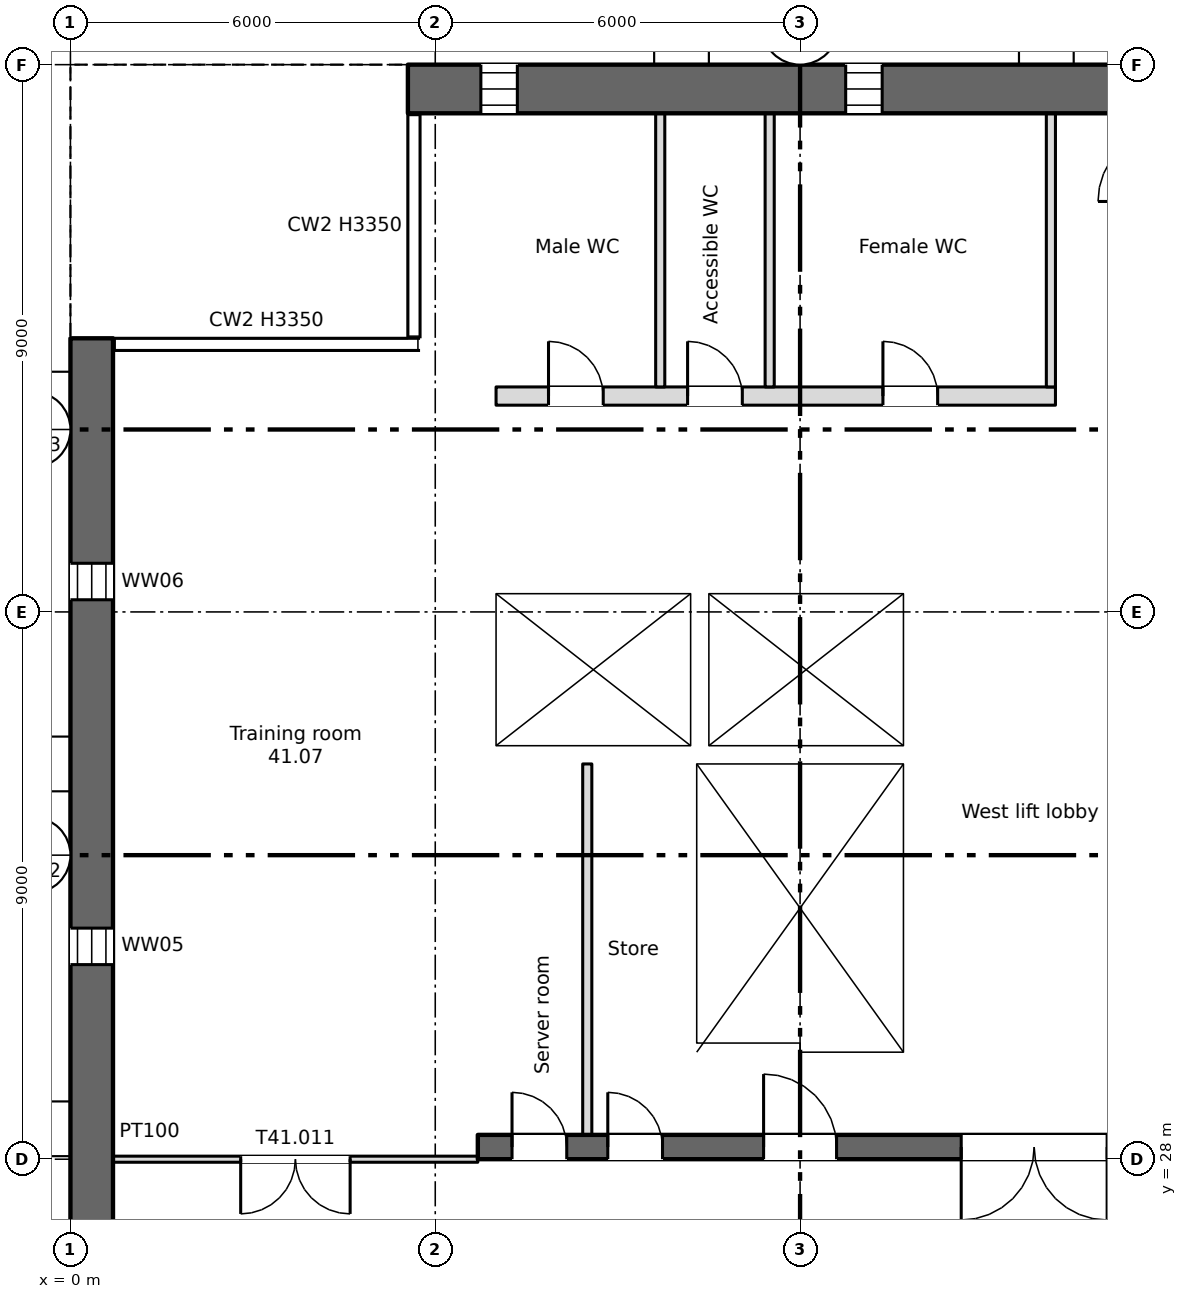
"""IFC4 building model, lengths in metres.
Left out: names, types, materials, properties, quantities, classifications, styles, units other than length and angle.
Written with IfcOpenShell. Run it as: python <this file> out.ifc"""

import sys

from ifc_helpers import new_model, si_unit, direction, frame, frame_2d, origin, place, context, subcontext, project, spatial, rectangle, extrude, element, fill, save


model = new_model("IFC4")
c1 = context("Model", 3, precision=1e-05, world=origin(), true_north=direction((0.0, 1.0)))
c2 = subcontext(c1, "Body", "Model", "MODEL_VIEW")
j1 = project(units=[si_unit("LENGTHUNIT", "METRE"), si_unit("PLANEANGLEUNIT", "RADIAN")], contexts=[c1])
p1 = place(None, origin())
s1 = spatial("IfcSite", under=j1, at=p1, CompositionType="ELEMENT")
p2 = place(p1, origin())
s2 = spatial("IfcBuilding", under=s1, at=p2, CompositionType="ELEMENT")
p3 = place(p2, frame((0.0, 0.0, 95.0)))
s3 = spatial("IfcBuildingStorey", under=s2, at=p3, CompositionType="ELEMENT", Elevation=95.0)
p4 = place(p3, frame((0.35, 6.0, 0.0), z_axis=(0.0, 0.0, 1.0), x_axis=(0.0, 1.0, 0.0)))
e1 = element("IfcWall", 1, at=p4, inside=s3, PredefinedType="SHEAR", context=c2, shape_type="SweptSolid", body=[
    extrude(rectangle(XDim=35.5, YDim=0.7, at=frame_2d((17.75, 0.0))), origin(), (0.0, 0.0, 1.0), 3.35),
])
p5 = place(p4, frame((1.2, 0.0, 0.6)))
e2 = element("IfcOpeningElement", 2, at=p5, cuts=e1, PredefinedType="OPENING", context=c2, shape_type="SweptSolid", body=[
    extrude(rectangle(XDim=0.6, YDim=2.4, at=frame_2d((0.3, 1.2))), frame((0.0, 0.36, 0.0), z_axis=(0.0, -1.0, 0.0), x_axis=(1.0, 0.0, 0.0)), (0.0, 0.0, 1.0), 0.72),
])
p6 = place(p4, frame((7.2, 0.0, 0.6)))
e3 = element("IfcOpeningElement", 3, at=p6, cuts=e1, PredefinedType="OPENING", context=c2, shape_type="SweptSolid", body=[
    extrude(rectangle(XDim=0.6, YDim=2.4, at=frame_2d((0.3, 1.2))), frame((0.0, 0.36, 0.0), z_axis=(0.0, -1.0, 0.0), x_axis=(1.0, 0.0, 0.0)), (0.0, 0.0, 1.0), 0.72),
])
p7 = place(p4, frame((13.2, 0.0, 0.6)))
e4 = element("IfcOpeningElement", 4, at=p7, cuts=e1, PredefinedType="OPENING", context=c2, shape_type="SweptSolid", body=[
    extrude(rectangle(XDim=0.6, YDim=2.4, at=frame_2d((0.3, 1.2))), frame((0.0, 0.36, 0.0), z_axis=(0.0, -1.0, 0.0), x_axis=(1.0, 0.0, 0.0)), (0.0, 0.0, 1.0), 0.72),
])
p8 = place(p4, frame((19.2, 0.0, 0.6)))
e5 = element("IfcOpeningElement", 5, at=p8, cuts=e1, PredefinedType="OPENING", context=c2, shape_type="SweptSolid", body=[
    extrude(rectangle(XDim=0.6, YDim=2.4, at=frame_2d((0.3, 1.2))), frame((0.0, 0.36, 0.0), z_axis=(0.0, -1.0, 0.0), x_axis=(1.0, 0.0, 0.0)), (0.0, 0.0, 1.0), 0.72),
])
p9 = place(p4, frame((25.2, 0.0, 0.6)))
e6 = element("IfcOpeningElement", 6, at=p9, cuts=e1, PredefinedType="OPENING", context=c2, shape_type="SweptSolid", body=[
    extrude(rectangle(XDim=0.6, YDim=2.4, at=frame_2d((0.3, 1.2))), frame((0.0, 0.36, 0.0), z_axis=(0.0, -1.0, 0.0), x_axis=(1.0, 0.0, 0.0)), (0.0, 0.0, 1.0), 0.72),
])
p10 = place(p4, frame((31.2, 0.0, 0.6)))
e7 = element("IfcOpeningElement", 7, at=p10, cuts=e1, PredefinedType="OPENING", context=c2, shape_type="SweptSolid", body=[
    extrude(rectangle(XDim=0.6, YDim=2.4, at=frame_2d((0.3, 1.2))), frame((0.0, 0.36, 0.0), z_axis=(0.0, -1.0, 0.0), x_axis=(1.0, 0.0, 0.0)), (0.0, 0.0, 1.0), 0.72),
])
p11 = place(p3, frame((5.55, 45.6, 0.0), z_axis=(0.0, 0.0, 1.0), x_axis=(1.0, 0.0, 0.0)))
e8 = element("IfcWall", 8, at=p11, inside=s3, PredefinedType="SHEAR", context=c2, shape_type="SweptSolid", body=[
    extrude(rectangle(XDim=60.9, YDim=0.8, at=frame_2d((30.45, 0.0))), origin(), (0.0, 0.0, 1.0), 3.35),
])
p12 = place(p11, frame((1.2, 0.0, 0.6)))
e9 = element("IfcOpeningElement", 9, at=p12, cuts=e8, PredefinedType="OPENING", context=c2, shape_type="SweptSolid", body=[
    extrude(rectangle(XDim=0.6, YDim=2.4, at=frame_2d((0.3, 1.2))), frame((0.0, 0.41, 0.0), z_axis=(0.0, -1.0, 0.0), x_axis=(1.0, 0.0, 0.0)), (0.0, 0.0, 1.0), 0.82),
])
p13 = place(p11, frame((7.2, 0.0, 0.6)))
e10 = element("IfcOpeningElement", 10, at=p13, cuts=e8, PredefinedType="OPENING", context=c2, shape_type="SweptSolid", body=[
    extrude(rectangle(XDim=0.6, YDim=2.4, at=frame_2d((0.3, 1.2))), frame((0.0, 0.41, 0.0), z_axis=(0.0, -1.0, 0.0), x_axis=(1.0, 0.0, 0.0)), (0.0, 0.0, 1.0), 0.82),
])
p14 = place(p11, frame((55.2, 0.0, 0.6)))
e11 = element("IfcOpeningElement", 11, at=p14, cuts=e8, PredefinedType="OPENING", context=c2, shape_type="SweptSolid", body=[
    extrude(rectangle(XDim=0.6, YDim=2.4, at=frame_2d((0.3, 1.2))), frame((0.0, 0.41, 0.0), z_axis=(0.0, -1.0, 0.0), x_axis=(1.0, 0.0, 0.0)), (0.0, 0.0, 1.0), 0.82),
])
p15 = place(p3, frame((6.7, 28.2, 0.0), z_axis=(0.0, 0.0, 1.0), x_axis=(1.0, 0.0, 0.0)))
e12 = element("IfcWall", 12, at=p15, inside=s3, PredefinedType="SHEAR", context=c2, shape_type="SweptSolid", body=[
    extrude(rectangle(XDim=57.8, YDim=0.4, at=frame_2d((28.9, 0.0))), origin(), (0.0, 0.0, 1.0), 3.35),
])
p16 = place(p15, frame((12.812, 0.0, 0.0)))
e13 = element("IfcOpeningElement", 13, at=p16, cuts=e12, PredefinedType="OPENING", context=c2, shape_type="SweptSolid", body=[
    extrude(rectangle(XDim=0.9, YDim=2.1, at=frame_2d((0.45, 1.05))), frame((0.0, 0.21, 0.0), z_axis=(0.0, -1.0, 0.0), x_axis=(1.0, 0.0, 0.0)), (0.0, 0.0, 1.0), 0.42),
])
p17 = place(p15, frame((15.387, 0.0, 0.0)))
e14 = element("IfcOpeningElement", 14, at=p17, cuts=e12, PredefinedType="OPENING", context=c2, shape_type="SweptSolid", body=[
    extrude(rectangle(XDim=0.9, YDim=2.1, at=frame_2d((0.45, 1.05))), frame((0.0, 0.21, 0.0), z_axis=(0.0, -1.0, 0.0), x_axis=(1.0, 0.0, 0.0)), (0.0, 0.0, 1.0), 0.42),
])
p18 = place(p15, frame((48.312, 0.0, 0.0)))
e15 = element("IfcOpeningElement", 15, at=p18, cuts=e12, PredefinedType="OPENING", context=c2, shape_type="SweptSolid", body=[
    extrude(rectangle(XDim=0.9, YDim=2.1, at=frame_2d((0.45, 1.05))), frame((0.0, 0.21, 0.0), z_axis=(0.0, -1.0, 0.0), x_axis=(1.0, 0.0, 0.0)), (0.0, 0.0, 1.0), 0.42),
])
p19 = place(p15, frame((50.887, 0.0, 0.0)))
e16 = element("IfcOpeningElement", 16, at=p19, cuts=e12, PredefinedType="OPENING", context=c2, shape_type="SweptSolid", body=[
    extrude(rectangle(XDim=0.9, YDim=2.1, at=frame_2d((0.45, 1.05))), frame((0.0, 0.21, 0.0), z_axis=(0.0, -1.0, 0.0), x_axis=(1.0, 0.0, 0.0)), (0.0, 0.0, 1.0), 0.42),
])
p20 = place(p15, frame((0.562, 0.0, 0.0)))
e17 = element("IfcOpeningElement", 17, at=p20, cuts=e12, PredefinedType="OPENING", context=c2, shape_type="SweptSolid", body=[
    extrude(rectangle(XDim=0.9, YDim=2.1, at=frame_2d((0.45, 1.05))), frame((0.0, 0.21, 0.0), z_axis=(0.0, -1.0, 0.0), x_axis=(1.0, 0.0, 0.0)), (0.0, 0.0, 1.0), 0.42),
])
p21 = place(p15, frame((2.137, 0.0, 0.0)))
e18 = element("IfcOpeningElement", 18, at=p21, cuts=e12, PredefinedType="OPENING", context=c2, shape_type="SweptSolid", body=[
    extrude(rectangle(XDim=0.9, YDim=2.1, at=frame_2d((0.45, 1.05))), frame((0.0, 0.21, 0.0), z_axis=(0.0, -1.0, 0.0), x_axis=(1.0, 0.0, 0.0)), (0.0, 0.0, 1.0), 0.42),
])
p22 = place(p15, frame((4.7, 0.0, 0.0)))
e19 = element("IfcOpeningElement", 19, at=p22, cuts=e12, PredefinedType="OPENING", context=c2, shape_type="SweptSolid", body=[
    extrude(rectangle(XDim=1.2, YDim=2.1, at=frame_2d((0.6, 1.05))), frame((0.0, 0.21, 0.0), z_axis=(0.0, -1.0, 0.0), x_axis=(1.0, 0.0, 0.0)), (0.0, 0.0, 1.0), 0.42),
])
p23 = place(p15, frame((31.7, 0.0, 0.0)))
e20 = element("IfcOpeningElement", 20, at=p23, cuts=e12, PredefinedType="OPENING", context=c2, shape_type="SweptSolid", body=[
    extrude(rectangle(XDim=1.2, YDim=2.1, at=frame_2d((0.6, 1.05))), frame((0.0, 0.21, 0.0), z_axis=(0.0, -1.0, 0.0), x_axis=(1.0, 0.0, 0.0)), (0.0, 0.0, 1.0), 0.42),
])
p24 = place(p15, frame((55.2, 0.0, 0.0)))
e21 = element("IfcOpeningElement", 21, at=p24, cuts=e12, PredefinedType="OPENING", context=c2, shape_type="SweptSolid", body=[
    extrude(rectangle(XDim=1.2, YDim=2.1, at=frame_2d((0.6, 1.05))), frame((0.0, 0.21, 0.0), z_axis=(0.0, -1.0, 0.0), x_axis=(1.0, 0.0, 0.0)), (0.0, 0.0, 1.0), 0.42),
])
p25 = place(p15, frame((21.7, 0.0, 0.0)))
e22 = element("IfcOpeningElement", 22, at=p25, cuts=e12, PredefinedType="OPENING", context=c2, shape_type="SweptSolid", body=[
    extrude(rectangle(XDim=1.2, YDim=2.1, at=frame_2d((0.6, 1.05))), frame((0.0, 0.21, 0.0), z_axis=(0.0, -1.0, 0.0), x_axis=(1.0, 0.0, 0.0)), (0.0, 0.0, 1.0), 0.42),
])
p26 = place(p15, frame((41.7, 0.0, 0.0)))
e23 = element("IfcOpeningElement", 23, at=p26, cuts=e12, PredefinedType="OPENING", context=c2, shape_type="SweptSolid", body=[
    extrude(rectangle(XDim=1.2, YDim=2.1, at=frame_2d((0.6, 1.05))), frame((0.0, 0.21, 0.0), z_axis=(0.0, -1.0, 0.0), x_axis=(1.0, 0.0, 0.0)), (0.0, 0.0, 1.0), 0.42),
])
p27 = place(p15, frame((24.85, 0.0, 0.0)))
e24 = element("IfcOpeningElement", 24, at=p27, cuts=e12, PredefinedType="OPENING", context=c2, shape_type="SweptSolid", body=[
    extrude(rectangle(XDim=2.4, YDim=2.1, at=frame_2d((1.2, 1.05))), frame((0.0, 0.21, 0.0), z_axis=(0.0, -1.0, 0.0), x_axis=(1.0, 0.0, 0.0)), (0.0, 0.0, 1.0), 0.42),
])
p28 = place(p15, frame((37.35, 0.0, 0.0)))
e25 = element("IfcOpeningElement", 25, at=p28, cuts=e12, PredefinedType="OPENING", context=c2, shape_type="SweptSolid", body=[
    extrude(rectangle(XDim=2.4, YDim=2.1, at=frame_2d((1.2, 1.05))), frame((0.0, 0.21, 0.0), z_axis=(0.0, -1.0, 0.0), x_axis=(1.0, 0.0, 0.0)), (0.0, 0.0, 1.0), 0.42),
])
p29 = place(p15, frame((7.95, 0.0, 0.0)))
e26 = element("IfcOpeningElement", 26, at=p29, cuts=e12, PredefinedType="OPENING", context=c2, shape_type="SweptSolid", body=[
    extrude(rectangle(XDim=2.4, YDim=2.1, at=frame_2d((1.2, 1.05))), frame((0.0, 0.21, 0.0), z_axis=(0.0, -1.0, 0.0), x_axis=(1.0, 0.0, 0.0)), (0.0, 0.0, 1.0), 0.42),
])
p30 = place(p15, frame((28.85, 0.0, 0.0)))
e27 = element("IfcOpeningElement", 27, at=p30, cuts=e12, PredefinedType="OPENING", context=c2, shape_type="SweptSolid", body=[
    extrude(rectangle(XDim=0.9, YDim=2.1, at=frame_2d((0.45, 1.05))), frame((0.0, 0.21, 0.0), z_axis=(0.0, -1.0, 0.0), x_axis=(1.0, 0.0, 0.0)), (0.0, 0.0, 1.0), 0.42),
])
p31 = place(p15, frame((34.85, 0.0, 0.0)))
e28 = element("IfcOpeningElement", 28, at=p31, cuts=e12, PredefinedType="OPENING", context=c2, shape_type="SweptSolid", body=[
    extrude(rectangle(XDim=0.9, YDim=2.1, at=frame_2d((0.45, 1.05))), frame((0.0, 0.21, 0.0), z_axis=(0.0, -1.0, 0.0), x_axis=(1.0, 0.0, 0.0)), (0.0, 0.0, 1.0), 0.42),
])
p32 = place(p3, frame((6.85, 28.4, 0.0), z_axis=(0.0, 0.0, 1.0), x_axis=(0.0, 1.0, 0.0)))
e29 = element("IfcWall", 29, at=p32, inside=s3, PredefinedType="SHEAR", context=c2, shape_type="SweptSolid", body=[
    extrude(rectangle(XDim=16.8, YDim=0.3, at=frame_2d((8.4, 0.0))), origin(), (0.0, 0.0, 1.0), 3.35),
])
for number, where, z_axis, x_axis in (
    (30, (10.15, 28.4, 0.0), (0.0, 0.0, 1.0), (0.0, 1.0, 0.0)),
    (31, (13.85, 28.4, 0.0), (0.0, 0.0, 1.0), (0.0, 1.0, 0.0)),
):
    element("IfcWall", number, at=place(p3, frame(where, z_axis=z_axis, x_axis=x_axis)), inside=s3, PredefinedType="SHEAR", context=c2, shape_type="SweptSolid", body=[
        extrude(rectangle(XDim=6.1, YDim=0.3, at=frame_2d((3.05, 0.0))), origin(), (0.0, 0.0, 1.0), 3.35),
    ])
for number, where, z_axis, x_axis in (
    (32, (7.0, 34.65, 0.0), (0.0, 0.0, 1.0), (1.0, 0.0, 0.0)),
    (33, (7.0, 37.45, 0.0), (0.0, 0.0, 1.0), (1.0, 0.0, 0.0)),
):
    element("IfcWall", number, at=place(p3, frame(where, z_axis=z_axis, x_axis=x_axis)), inside=s3, PredefinedType="SHEAR", context=c2, shape_type="SweptSolid", body=[
        extrude(rectangle(XDim=7.0, YDim=0.3, at=frame_2d((3.5, 0.0))), origin(), (0.0, 0.0, 1.0), 3.35),
    ])
p33 = place(p3, frame((13.85, 34.8, 0.0), z_axis=(0.0, 0.0, 1.0), x_axis=(0.0, 1.0, 0.0)))
e34 = element("IfcWall", 34, at=p33, inside=s3, PredefinedType="SHEAR", context=c2, shape_type="SweptSolid", body=[
    extrude(rectangle(XDim=2.5, YDim=0.3, at=frame_2d((1.25, 0.0))), origin(), (0.0, 0.0, 1.0), 3.35),
])
p34 = place(p3, frame((7.0, 40.55, 0.0), z_axis=(0.0, 0.0, 1.0), x_axis=(1.0, 0.0, 0.0)))
e35 = element("IfcWall", 35, at=p34, inside=s3, PredefinedType="PARTITIONING", context=c2, shape_type="SweptSolid", body=[
    extrude(rectangle(XDim=9.2, YDim=0.3, at=frame_2d((4.6, 0.0))), origin(), (0.0, 0.0, 1.0), 3.35),
])
p35 = place(p34, frame((0.863, 0.0, 0.0)))
e36 = element("IfcOpeningElement", 36, at=p35, cuts=e35, PredefinedType="OPENING", context=c2, shape_type="SweptSolid", body=[
    extrude(rectangle(XDim=0.9, YDim=2.1, at=frame_2d((0.45, 1.05))), frame((0.0, 0.16, 0.0), z_axis=(0.0, -1.0, 0.0), x_axis=(1.0, 0.0, 0.0)), (0.0, 0.0, 1.0), 0.32),
])
p36 = place(p34, frame((3.15, 0.0, 0.0)))
e37 = element("IfcOpeningElement", 37, at=p36, cuts=e35, PredefinedType="OPENING", context=c2, shape_type="SweptSolid", body=[
    extrude(rectangle(XDim=0.9, YDim=2.1, at=frame_2d((0.45, 1.05))), frame((0.0, 0.16, 0.0), z_axis=(0.0, -1.0, 0.0), x_axis=(1.0, 0.0, 0.0)), (0.0, 0.0, 1.0), 0.32),
])
p37 = place(p34, frame((6.363, 0.0, 0.0)))
e38 = element("IfcOpeningElement", 38, at=p37, cuts=e35, PredefinedType="OPENING", context=c2, shape_type="SweptSolid", body=[
    extrude(rectangle(XDim=0.9, YDim=2.1, at=frame_2d((0.45, 1.05))), frame((0.0, 0.16, 0.0), z_axis=(0.0, -1.0, 0.0), x_axis=(1.0, 0.0, 0.0)), (0.0, 0.0, 1.0), 0.32),
])
p38 = place(p3, frame((10.35, 34.8, 0.0), z_axis=(0.0, 0.0, 1.0), x_axis=(0.0, 1.0, 0.0)))
e39 = element("IfcWall", 39, at=p38, inside=s3, PredefinedType="SHEAR", context=c2, shape_type="SweptSolid", body=[
    extrude(rectangle(XDim=2.5, YDim=0.3, at=frame_2d((1.25, 0.0))), origin(), (0.0, 0.0, 1.0), 3.35),
])
p39 = place(p3, frame((16.125, 40.7, 0.0), z_axis=(0.0, 0.0, 1.0), x_axis=(0.0, 1.0, 0.0)))
e40 = element("IfcWall", 40, at=p39, inside=s3, PredefinedType="PARTITIONING", context=c2, shape_type="SweptSolid", body=[
    extrude(rectangle(XDim=4.5, YDim=0.15, at=frame_2d((2.25, 0.0))), origin(), (0.0, 0.0, 1.0), 3.35),
])
p40 = place(p3, frame((8.5, 28.4, 0.0), z_axis=(0.0, 0.0, 1.0), x_axis=(0.0, 1.0, 0.0)))
e41 = element("IfcWall", 41, at=p40, inside=s3, PredefinedType="PARTITIONING", context=c2, shape_type="SweptSolid", body=[
    extrude(rectangle(XDim=6.1, YDim=0.15, at=frame_2d((3.05, 0.0))), origin(), (0.0, 0.0, 1.0), 3.35),
])
for number, where, z_axis, x_axis in (
    (42, (9.7, 40.7, 0.0), (0.0, 0.0, 1.0), (0.0, 1.0, 0.0)),
    (43, (11.5, 40.7, 0.0), (0.0, 0.0, 1.0), (0.0, 1.0, 0.0)),
):
    element("IfcWall", number, at=place(p3, frame(where, z_axis=z_axis, x_axis=x_axis)), inside=s3, PredefinedType="PARTITIONING", context=c2, shape_type="SweptSolid", body=[
        extrude(rectangle(XDim=4.5, YDim=0.15, at=frame_2d((2.25, 0.0))), origin(), (0.0, 0.0, 1.0), 3.35),
    ])
p41 = place(p3, frame((0.7, 28.0, 0.0), z_axis=(0.0, 0.0, 1.0), x_axis=(1.0, 0.0, 0.0)))
e44 = element("IfcWall", 44, at=p41, inside=s3, PredefinedType="PARTITIONING", context=c2, shape_type="SweptSolid", body=[
    extrude(rectangle(XDim=6.0, YDim=0.1, at=frame_2d((3.0, 0.0))), origin(), (0.0, 0.0, 1.0), 3.35),
])
p42 = place(p41, frame((2.1, 0.0, 0.0)))
e45 = element("IfcOpeningElement", 45, at=p42, cuts=e44, PredefinedType="OPENING", context=c2, shape_type="SweptSolid", body=[
    extrude(rectangle(XDim=1.8, YDim=2.1, at=frame_2d((0.9, 1.05))), frame((0.0, 0.06, 0.0), z_axis=(0.0, -1.0, 0.0), x_axis=(1.0, 0.0, 0.0)), (0.0, 0.0, 1.0), 0.12),
])
p43 = place(p12, origin())
e46 = element("IfcWindow", 46, at=p43, inside=s3, PartitioningType="SINGLE_PANEL", PredefinedType="WINDOW", context=c2, shape_type="SweptSolid", body=[
    extrude(rectangle(XDim=0.6, YDim=2.4, at=frame_2d((0.3, 1.2))), frame((0.0, 0.03, 0.0), z_axis=(0.0, -1.0, 0.0), x_axis=(1.0, 0.0, 0.0)), (0.0, 0.0, 1.0), 0.06),
])
fill(e9, e46)
p44 = place(p13, origin())
e47 = element("IfcWindow", 47, at=p44, inside=s3, PartitioningType="SINGLE_PANEL", PredefinedType="WINDOW", context=c2, shape_type="SweptSolid", body=[
    extrude(rectangle(XDim=0.6, YDim=2.4, at=frame_2d((0.3, 1.2))), frame((0.0, 0.03, 0.0), z_axis=(0.0, -1.0, 0.0), x_axis=(1.0, 0.0, 0.0)), (0.0, 0.0, 1.0), 0.06),
])
fill(e10, e47)
p45 = place(p9, origin())
e48 = element("IfcWindow", 48, at=p45, inside=s3, PartitioningType="SINGLE_PANEL", PredefinedType="WINDOW", context=c2, shape_type="SweptSolid", body=[
    extrude(rectangle(XDim=0.6, YDim=2.4, at=frame_2d((0.3, 1.2))), frame((0.0, 0.03, 0.0), z_axis=(0.0, -1.0, 0.0), x_axis=(1.0, 0.0, 0.0)), (0.0, 0.0, 1.0), 0.06),
])
fill(e6, e48)
p46 = place(p10, origin())
e49 = element("IfcWindow", 49, at=p46, inside=s3, PartitioningType="SINGLE_PANEL", PredefinedType="WINDOW", context=c2, shape_type="SweptSolid", body=[
    extrude(rectangle(XDim=0.6, YDim=2.4, at=frame_2d((0.3, 1.2))), frame((0.0, 0.03, 0.0), z_axis=(0.0, -1.0, 0.0), x_axis=(1.0, 0.0, 0.0)), (0.0, 0.0, 1.0), 0.06),
])
fill(e7, e49)
p47 = place(p20, origin())
e50 = element("IfcDoor", 50, at=p47, inside=s3, OperationType="SINGLE_SWING_LEFT", PredefinedType="DOOR", context=c2, shape_type="SweptSolid", body=[
    extrude(rectangle(XDim=0.9, YDim=2.1, at=frame_2d((0.45, 1.05))), frame((0.0, 0.025, 0.0), z_axis=(0.0, -1.0, 0.0), x_axis=(1.0, 0.0, 0.0)), (0.0, 0.0, 1.0), 0.05),
])
fill(e17, e50)
p48 = place(p21, origin())
e51 = element("IfcDoor", 51, at=p48, inside=s3, OperationType="SINGLE_SWING_LEFT", PredefinedType="DOOR", context=c2, shape_type="SweptSolid", body=[
    extrude(rectangle(XDim=0.9, YDim=2.1, at=frame_2d((0.45, 1.05))), frame((0.0, 0.025, 0.0), z_axis=(0.0, -1.0, 0.0), x_axis=(1.0, 0.0, 0.0)), (0.0, 0.0, 1.0), 0.05),
])
fill(e18, e51)
p49 = place(p35, origin())
e52 = element("IfcDoor", 52, at=p49, inside=s3, OperationType="SINGLE_SWING_LEFT", PredefinedType="DOOR", context=c2, shape_type="SweptSolid", body=[
    extrude(rectangle(XDim=0.9, YDim=2.1, at=frame_2d((0.45, 1.05))), frame((0.0, 0.025, 0.0), z_axis=(0.0, -1.0, 0.0), x_axis=(1.0, 0.0, 0.0)), (0.0, 0.0, 1.0), 0.05),
])
fill(e36, e52)
p50 = place(p36, origin())
e53 = element("IfcDoor", 53, at=p50, inside=s3, OperationType="SINGLE_SWING_LEFT", PredefinedType="DOOR", context=c2, shape_type="SweptSolid", body=[
    extrude(rectangle(XDim=0.9, YDim=2.1, at=frame_2d((0.45, 1.05))), frame((0.0, 0.025, 0.0), z_axis=(0.0, -1.0, 0.0), x_axis=(1.0, 0.0, 0.0)), (0.0, 0.0, 1.0), 0.05),
])
fill(e37, e53)
p51 = place(p37, origin())
e54 = element("IfcDoor", 54, at=p51, inside=s3, OperationType="SINGLE_SWING_LEFT", PredefinedType="DOOR", context=c2, shape_type="SweptSolid", body=[
    extrude(rectangle(XDim=0.9, YDim=2.1, at=frame_2d((0.45, 1.05))), frame((0.0, 0.025, 0.0), z_axis=(0.0, -1.0, 0.0), x_axis=(1.0, 0.0, 0.0)), (0.0, 0.0, 1.0), 0.05),
])
fill(e38, e54)
p52 = place(p22, origin())
e55 = element("IfcDoor", 55, at=p52, inside=s3, OperationType="SINGLE_SWING_LEFT", PredefinedType="DOOR", context=c2, shape_type="SweptSolid", body=[
    extrude(rectangle(XDim=1.2, YDim=2.1, at=frame_2d((0.6, 1.05))), frame((0.0, 0.025, 0.0), z_axis=(0.0, -1.0, 0.0), x_axis=(1.0, 0.0, 0.0)), (0.0, 0.0, 1.0), 0.05),
])
fill(e19, e55)
p53 = place(p29, origin())
e56 = element("IfcDoor", 56, at=p53, inside=s3, OperationType="DOUBLE_DOOR_SINGLE_SWING", PredefinedType="DOOR", context=c2, shape_type="SweptSolid", body=[
    extrude(rectangle(XDim=2.4, YDim=2.1, at=frame_2d((1.2, 1.05))), frame((0.0, 0.025, 0.0), z_axis=(0.0, -1.0, 0.0), x_axis=(1.0, 0.0, 0.0)), (0.0, 0.0, 1.0), 0.05),
])
fill(e26, e56)
p54 = place(p42, origin())
e57 = element("IfcDoor", 57, at=p54, inside=s3, OperationType="DOUBLE_DOOR_SINGLE_SWING", PredefinedType="DOOR", context=c2, shape_type="SweptSolid", body=[
    extrude(rectangle(XDim=1.8, YDim=2.1, at=frame_2d((0.9, 1.05))), frame((0.0, 0.025, 0.0), z_axis=(0.0, -1.0, 0.0), x_axis=(1.0, 0.0, 0.0)), (0.0, 0.0, 1.0), 0.05),
])
fill(e45, e57)
save(model, sys.argv[1])
